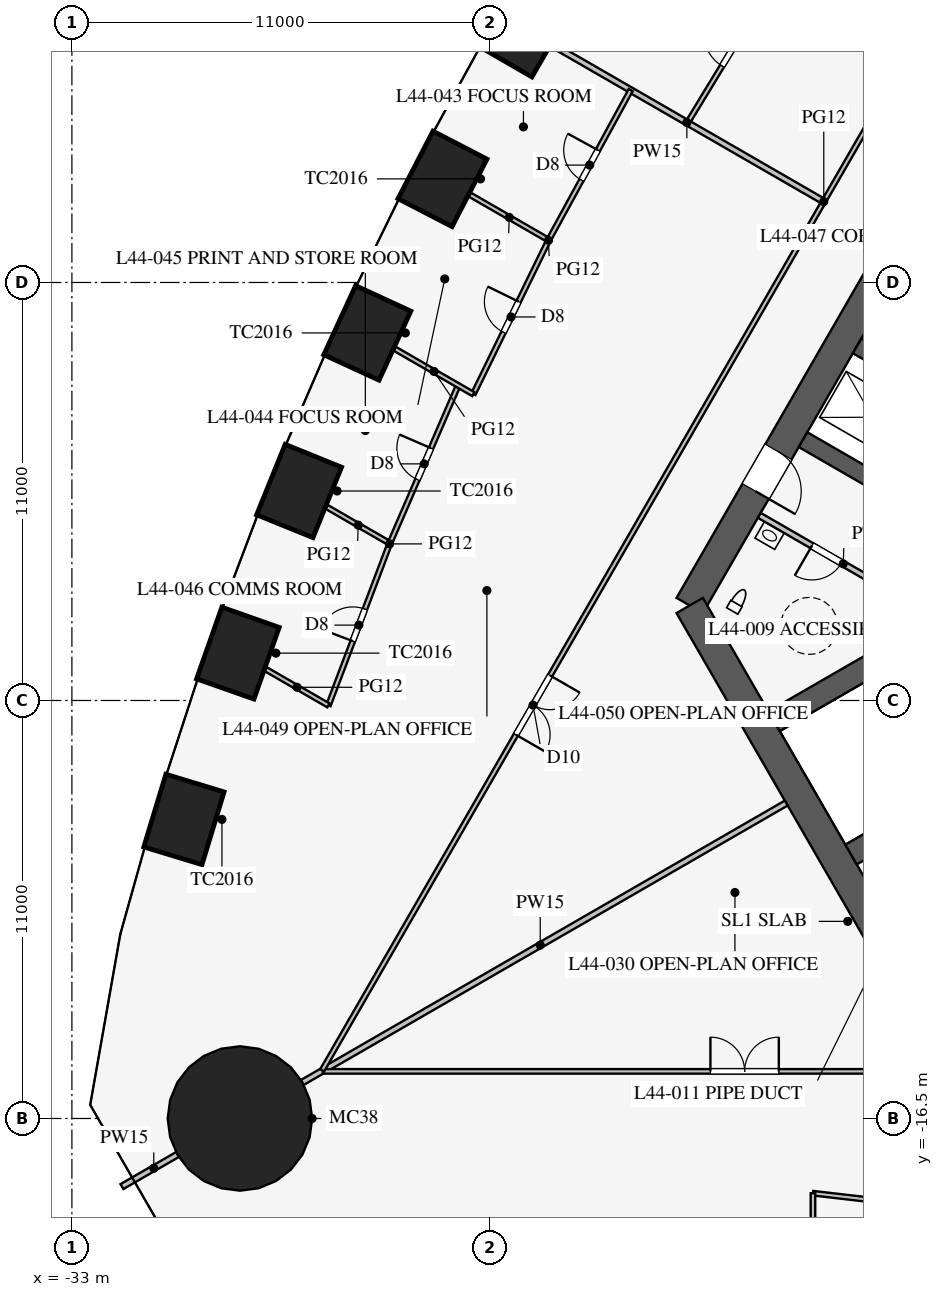
"""IFC4 building model, lengths in metres.
Left out: names, types, materials, properties, quantities, classifications, styles, units other than length and angle.
Written with IfcOpenShell. Run it as: python <this file> out.ifc"""

import sys

from ifc_helpers import new_model, si_unit, direction, frame, frame_2d, origin, origin_2d, place, context, subcontext, project, spatial, rectangle, circle, extrude, element, fill, save


model = new_model("IFC4")
c1 = context("Model", 3, precision=1e-05, world=origin(), true_north=direction((0.0, 1.0)))
c2 = subcontext(c1, "Body", "Model", "MODEL_VIEW")
j1 = project(units=[si_unit("LENGTHUNIT", "METRE"), si_unit("PLANEANGLEUNIT", "RADIAN")], contexts=[c1])
p1 = place(None, origin())
s1 = spatial("IfcSite", under=j1, at=p1, CompositionType="ELEMENT")
p2 = place(p1, origin())
s2 = spatial("IfcBuilding", under=s1, at=p2, CompositionType="ELEMENT")
p3 = place(p2, frame((0.0, 0.0, 193.9)))
s3 = spatial("IfcBuildingStorey", under=s2, at=p3, CompositionType="ELEMENT", Elevation=193.9)
for number, where, z_axis, x_axis in (
    (1, (-21.088, 12.175, 0.0), (0.0, 0.0, 1.0), (-0.5, -0.866, 0.0)),
    (2, (-23.248, 8.226, 0.0), (0.0, 0.0, 1.0), (-0.46, -0.888, 0.0)),
    (3, (-25.227, 4.172, 0.0), (0.0, 0.0, 1.0), (-0.418, -0.908, 0.0)),
    (4, (-27.022, 0.013, 0.0), (0.0, 0.0, 1.0), (-0.376, -0.927, 0.0)),
    (5, (-28.632, -4.254, 0.0), (0.0, 0.0, 1.0), (-0.332, -0.943, 0.0)),
    (6, (-30.052, -8.63, 0.0), (0.0, 0.0, 1.0), (-0.29, -0.957, 0.0)),
):
    element("IfcColumn", number, at=place(p3, frame(where, z_axis=z_axis, x_axis=x_axis)), inside=s3, PredefinedType="COLUMN", context=c2, shape_type="SweptSolid", body=[
        extrude(rectangle(XDim=2.0, YDim=1.6, at=origin_2d()), origin(), (0.0, 0.0, 1.0), 4.2),
    ])
p4 = place(p3, frame((-28.579, -16.5, 0.0), z_axis=(0.0, 0.0, 1.0), x_axis=(1.0, 0.0, 0.0)))
e7 = element("IfcColumn", 7, at=p4, inside=s3, PredefinedType="COLUMN", context=c2, shape_type="SweptSolid", body=[
    extrude(circle(Radius=1.9, at=origin_2d()), origin(), (0.0, 0.0, 1.0), 4.2),
])
p5 = place(p3, frame((-5.773, 16.0, 0.0), z_axis=(0.0, 0.0, 1.0), x_axis=(-0.500002442456, -0.866023993627, 0.0)))
e8 = element("IfcWall", 8, at=p5, inside=s3, PredefinedType="SHEAR", context=c2, shape_type="SweptSolid", body=[
    extrude(rectangle(XDim=21.939, YDim=0.8, at=frame_2d((10.97, 0.0))), origin(), (0.0, 0.0, 1.0), 4.2),
])
p6 = place(p5, frame((17.27, 0.0, 0.0)))
e9 = element("IfcOpeningElement", 9, at=p6, cuts=e8, PredefinedType="OPENING", context=c2, shape_type="SweptSolid", body=[
    extrude(rectangle(XDim=1.2, YDim=2.1, at=frame_2d((0.6, 1.05))), frame((0.0, 0.41, 0.0), z_axis=(0.0, -1.0, 0.0), x_axis=(1.0, 0.0, 0.0)), (0.0, 0.0, 1.0), 0.82),
])
p7 = place(p5, frame((3.47, 0.0, 0.0)))
e10 = element("IfcOpeningElement", 10, at=p7, cuts=e8, PredefinedType="OPENING", context=c2, shape_type="SweptSolid", body=[
    extrude(rectangle(XDim=1.2, YDim=2.1, at=frame_2d((0.6, 1.05))), frame((0.0, 0.41, 0.0), z_axis=(0.0, -1.0, 0.0), x_axis=(1.0, 0.0, 0.0)), (0.0, 0.0, 1.0), 0.82),
])
p8 = place(p3, frame((-16.743, -3.0, 0.0), z_axis=(0.0, 0.0, 1.0), x_axis=(0.499995765644, -0.866027848477, 0.0)))
e11 = element("IfcWall", 11, at=p8, inside=s3, PredefinedType="SHEAR", context=c2, shape_type="SweptSolid", body=[
    extrude(rectangle(XDim=11.547, YDim=0.8, at=frame_2d((5.773, 0.0))), origin(), (0.0, 0.0, 1.0), 4.2),
])
for number, where, z_axis, x_axis in (
    (12, (-10.107, 2.544, 0.0), (0.0, 0.0, 1.0), (-0.866, 0.5, 0.0)),
    (13, (-11.532, 0.076, 0.0), (0.0, 0.0, 1.0), (-0.866, 0.5, 0.0)),
):
    element("IfcWall", number, at=place(p3, frame(where, z_axis=z_axis, x_axis=x_axis)), inside=s3, PredefinedType="SHEAR", context=c2, shape_type="SweptSolid", body=[
        extrude(rectangle(XDim=2.575, YDim=0.45, at=frame_2d((1.288, 0.0))), origin(), (0.0, 0.0, 1.0), 4.2),
    ])
for number, where, z_axis, x_axis in (
    (14, (-6.663, -1.509, 0.0), (0.0, 0.0, 1.0), (-0.866, -0.5, 0.0)),
    (15, (-4.638, -5.016, 0.0), (0.0, 0.0, 1.0), (-0.866, -0.5, 0.0)),
):
    element("IfcWall", number, at=place(p3, frame(where, z_axis=z_axis, x_axis=x_axis)), inside=s3, PredefinedType="SHEAR", context=c2, shape_type="SweptSolid", body=[
        extrude(rectangle(XDim=9.075, YDim=0.6, at=frame_2d((4.538, 0.0))), origin(), (0.0, 0.0, 1.0), 4.2),
    ])
p9 = place(p3, frame((-10.495, -3.178, 0.0), z_axis=(0.0, 0.0, 1.0), x_axis=(-0.86602216432, 0.500005610874, 0.0)))
e16 = element("IfcWall", 16, at=p9, inside=s3, PredefinedType="PARTITIONING", context=c2, shape_type="SweptSolid", body=[
    extrude(rectangle(XDim=5.1, YDim=0.15, at=frame_2d((2.55, 0.0))), origin(), (0.0, 0.0, 1.0), 4.0),
])
p10 = place(p9, frame((2.6, 0.0, 0.0)))
e17 = element("IfcOpeningElement", 17, at=p10, cuts=e16, PredefinedType="OPENING", context=c2, shape_type="SweptSolid", body=[
    extrude(rectangle(XDim=0.9, YDim=2.1, at=frame_2d((0.45, 1.05))), frame((0.0, 0.085, 0.0), z_axis=(0.0, -1.0, 0.0), x_axis=(1.0, 0.0, 0.0)), (0.0, 0.0, 1.0), 0.17),
])
p11 = place(p3, frame((-14.203, -8.2, 0.0), z_axis=(0.0, 0.0, 1.0), x_axis=(-0.866021600284, -0.500006587798, 0.0)))
e18 = element("IfcWall", 18, at=p11, inside=s3, PredefinedType="PARTITIONING", context=c2, shape_type="SweptSolid", body=[
    extrude(rectangle(XDim=14.95, YDim=0.15, at=frame_2d((7.475, 0.0))), origin(), (0.0, 0.0, 1.0), 2.4),
])
p12 = place(p3, frame((-30.008, -17.325, 0.0), z_axis=(0.0, 0.0, 1.0), x_axis=(-0.866013246922, -0.500021055713, 0.0)))
e19 = element("IfcWall", 19, at=p12, inside=s3, PredefinedType="PARTITIONING", context=c2, shape_type="SweptSolid", body=[
    extrude(rectangle(XDim=1.935, YDim=0.15, at=frame_2d((0.967, 0.0))), origin(), (0.0, 0.0, 1.0), 2.4),
])
p13 = place(p3, frame((-26.398, -15.26, 0.0), z_axis=(0.0, 0.0, 1.0), x_axis=(1.0, 0.0, 0.0)))
e20 = element("IfcWall", 20, at=p13, inside=s3, PredefinedType="PARTITIONING", context=c2, shape_type="SweptSolid", body=[
    extrude(rectangle(XDim=52.796, YDim=0.12, at=frame_2d((26.398, 0.0))), origin(), (0.0, 0.0, 1.0), 2.9),
])
p14 = place(p13, frame((10.2, 0.0, 0.15)))
e21 = element("IfcOpeningElement", 21, at=p14, cuts=e20, PredefinedType="OPENING", context=c2, shape_type="SweptSolid", body=[
    extrude(rectangle(XDim=1.8, YDim=2.1, at=frame_2d((0.9, 1.05))), frame((0.0, 0.07, 0.0), z_axis=(0.0, -1.0, 0.0), x_axis=(1.0, 0.0, 0.0)), (0.0, 0.0, 1.0), 0.14),
])
p15 = place(p13, frame((40.8, 0.0, 0.15)))
e22 = element("IfcOpeningElement", 22, at=p15, cuts=e20, PredefinedType="OPENING", context=c2, shape_type="SweptSolid", body=[
    extrude(rectangle(XDim=1.8, YDim=2.1, at=frame_2d((0.9, 1.05))), frame((0.0, 0.07, 0.0), z_axis=(0.0, -1.0, 0.0), x_axis=(1.0, 0.0, 0.0)), (0.0, 0.0, 1.0), 0.14),
])
p16 = place(p3, frame((-13.5, -18.466, 0.0), z_axis=(0.0, 0.0, 1.0), x_axis=(0.993382946625, -0.114849124309, 0.0)))
e23 = element("IfcWall", 23, at=p16, inside=s3, PredefinedType="PARTITIONING", context=c2, shape_type="SweptSolid", body=[
    extrude(rectangle(XDim=4.53, YDim=0.12, at=frame_2d((2.265, 0.0))), origin(), (0.0, 0.0, 1.0), 2.9),
])
p17 = place(p3, frame((-13.5, -18.466, 0.0), z_axis=(0.0, 0.0, 1.0), x_axis=(0.0, -1.0, 0.0)))
e24 = element("IfcWall", 24, at=p17, inside=s3, PredefinedType="PARTITIONING", context=c2, shape_type="SweptSolid", body=[
    extrude(rectangle(XDim=4.104, YDim=0.12, at=frame_2d((2.052, 0.0))), origin(), (0.0, 0.0, 1.0), 2.8),
])
p18 = place(p3, frame((-13.268, 7.66, 0.0), z_axis=(0.0, 0.0, 1.0), x_axis=(-0.866019499219, 0.500010226868, 0.0)))
e25 = element("IfcWall", 25, at=p18, inside=s3, PredefinedType="PARTITIONING", context=c2, shape_type="SweptSolid", body=[
    extrude(rectangle(XDim=8.2, YDim=0.15, at=frame_2d((4.1, 0.0))), origin(), (0.0, 0.0, 1.0), 2.992),
])
p19 = place(p3, frame((-0.016, 30.491, 0.0), z_axis=(0.0, 0.0, 1.0), x_axis=(-0.50000091641, -0.866024874695, 0.0)))
e26 = element("IfcWall", 26, at=p19, inside=s3, PredefinedType="PARTITIONING", context=c2, shape_type="SweptSolid", body=[
    extrude(rectangle(XDim=52.796, YDim=0.12, at=frame_2d((26.398, 0.0))), origin(), (0.0, 0.0, 1.0), 2.9),
])
p20 = place(p19, frame((10.2, 0.0, 0.15)))
e27 = element("IfcOpeningElement", 27, at=p20, cuts=e26, PredefinedType="OPENING", context=c2, shape_type="SweptSolid", body=[
    extrude(rectangle(XDim=1.8, YDim=2.1, at=frame_2d((0.9, 1.05))), frame((0.0, 0.07, 0.0), z_axis=(0.0, -1.0, 0.0), x_axis=(1.0, 0.0, 0.0)), (0.0, 0.0, 1.0), 0.14),
])
p21 = place(p19, frame((40.8, 0.0, 0.15)))
e28 = element("IfcOpeningElement", 28, at=p21, cuts=e26, PredefinedType="OPENING", context=c2, shape_type="SweptSolid", body=[
    extrude(rectangle(XDim=1.8, YDim=2.1, at=frame_2d((0.9, 1.05))), frame((0.0, 0.07, 0.0), z_axis=(0.0, -1.0, 0.0), x_axis=(1.0, 0.0, 0.0)), (0.0, 0.0, 1.0), 0.14),
])
p22 = place(p3, frame((-18.295, 10.563, 0.0), z_axis=(0.0, 0.0, 1.0), x_axis=(-0.479972822547, -0.877283357654, 0.0)))
e29 = element("IfcWall", 29, at=p22, inside=s3, PredefinedType="PARTITIONING", context=c2, shape_type="SweptSolid", body=[
    extrude(rectangle(XDim=4.501, YDim=0.12, at=frame_2d((2.25, 0.0))), origin(), (0.0, 0.0, 1.0), 2.9),
])
p23 = place(p22, frame((1.8, 0.0, 0.15)))
e30 = element("IfcOpeningElement", 30, at=p23, cuts=e29, PredefinedType="OPENING", context=c2, shape_type="SweptSolid", body=[
    extrude(rectangle(XDim=0.9, YDim=2.1, at=frame_2d((0.45, 1.05))), frame((0.0, 0.07, 0.0), z_axis=(0.0, -1.0, 0.0), x_axis=(1.0, 0.0, 0.0)), (0.0, 0.0, 1.0), 0.14),
])
p24 = place(p3, frame((-24.634, -1.366, 0.0), z_axis=(0.0, 0.0, 1.0), x_axis=(-0.3542667952, -0.935144394101, 0.0)))
e31 = element("IfcWall", 31, at=p24, inside=s3, PredefinedType="PARTITIONING", context=c2, shape_type="SweptSolid", body=[
    extrude(rectangle(XDim=4.559, YDim=0.12, at=frame_2d((2.28, 0.0))), origin(), (0.0, 0.0, 1.0), 2.9),
])
p25 = place(p24, frame((1.85, 0.0, 0.15)))
e32 = element("IfcOpeningElement", 32, at=p25, cuts=e31, PredefinedType="OPENING", context=c2, shape_type="SweptSolid", body=[
    extrude(rectangle(XDim=0.9, YDim=2.1, at=frame_2d((0.45, 1.05))), frame((0.0, 0.07, 0.0), z_axis=(0.0, -1.0, 0.0), x_axis=(1.0, 0.0, 0.0)), (0.0, 0.0, 1.0), 0.14),
])
p26 = place(p3, frame((-20.456, 6.614, 0.0), z_axis=(0.0, 0.0, 1.0), x_axis=(-0.43911984878, -0.898428493764, 0.0)))
e33 = element("IfcWall", 33, at=p26, inside=s3, PredefinedType="PARTITIONING", context=c2, shape_type="SweptSolid", body=[
    extrude(rectangle(XDim=4.511, YDim=0.12, at=frame_2d((2.255, 0.0))), origin(), (0.0, 0.0, 1.0), 2.9),
])
p27 = place(p26, frame((1.8, 0.0, 0.15)))
e34 = element("IfcOpeningElement", 34, at=p27, cuts=e33, PredefinedType="OPENING", context=c2, shape_type="SweptSolid", body=[
    extrude(rectangle(XDim=0.9, YDim=2.1, at=frame_2d((0.45, 1.05))), frame((0.0, 0.07, 0.0), z_axis=(0.0, -1.0, 0.0), x_axis=(1.0, 0.0, 0.0)), (0.0, 0.0, 1.0), 0.14),
])
p28 = place(p3, frame((-22.835, 2.792, 0.0), z_axis=(0.0, 0.0, 1.0), x_axis=(-0.397208101111, -0.917728567939, 0.0)))
e35 = element("IfcWall", 35, at=p28, inside=s3, PredefinedType="PARTITIONING", context=c2, shape_type="SweptSolid", body=[
    extrude(rectangle(XDim=4.53, YDim=0.12, at=frame_2d((2.265, 0.0))), origin(), (0.0, 0.0, 1.0), 2.9),
])
p29 = place(p28, frame((1.8, 0.0, 0.15)))
e36 = element("IfcOpeningElement", 36, at=p29, cuts=e35, PredefinedType="OPENING", context=c2, shape_type="SweptSolid", body=[
    extrude(rectangle(XDim=0.9, YDim=2.1, at=frame_2d((0.45, 1.05))), frame((0.0, 0.07, 0.0), z_axis=(0.0, -1.0, 0.0), x_axis=(1.0, 0.0, 0.0)), (0.0, 0.0, 1.0), 0.14),
])
p30 = place(p3, frame((-14.462, 13.546, 0.0), z_axis=(0.0, 0.0, 1.0), x_axis=(-0.519790350351, -0.85429385558, 0.0)))
e37 = element("IfcWall", 37, at=p30, inside=s3, PredefinedType="PARTITIONING", context=c2, shape_type="SweptSolid", body=[
    extrude(rectangle(XDim=4.501, YDim=0.12, at=frame_2d((2.25, 0.0))), origin(), (0.0, 0.0, 1.0), 2.9),
])
p31 = place(p30, frame((1.75, 0.0, 0.15)))
e38 = element("IfcOpeningElement", 38, at=p31, cuts=e37, PredefinedType="OPENING", context=c2, shape_type="SweptSolid", body=[
    extrude(rectangle(XDim=1.0, YDim=2.1, at=frame_2d((0.5, 1.05))), frame((0.0, 0.07, 0.0), z_axis=(0.0, -1.0, 0.0), x_axis=(1.0, 0.0, 0.0)), (0.0, 0.0, 1.0), 0.14),
])
p32 = place(p3, frame((-24.634, -1.366, 0.0), z_axis=(0.0, 0.0, 1.0), x_axis=(-0.86603520599, 0.499983021698, 0.0)))
e39 = element("IfcWall", 39, at=p32, inside=s3, PredefinedType="PARTITIONING", context=c2, shape_type="SweptSolid", body=[
    extrude(rectangle(XDim=1.919, YDim=0.12, at=frame_2d((0.96, 0.0))), origin(), (0.0, 0.0, 1.0), 2.8),
])
p33 = place(p3, frame((-26.25, -5.629, 0.0), z_axis=(0.0, 0.0, 1.0), x_axis=(-0.866036337748, 0.499981061341, 0.0)))
e40 = element("IfcWall", 40, at=p33, inside=s3, PredefinedType="PARTITIONING", context=c2, shape_type="SweptSolid", body=[
    extrude(rectangle(XDim=1.907, YDim=0.12, at=frame_2d((0.953, 0.0))), origin(), (0.0, 0.0, 1.0), 2.8),
])
p34 = place(p3, frame((-20.456, 6.614, 0.0), z_axis=(0.0, 0.0, 1.0), x_axis=(-0.866030989016, 0.499990325971, 0.0)))
e41 = element("IfcWall", 41, at=p34, inside=s3, PredefinedType="PARTITIONING", context=c2, shape_type="SweptSolid", body=[
    extrude(rectangle(XDim=2.393, YDim=0.12, at=frame_2d((1.197, 0.0))), origin(), (0.0, 0.0, 1.0), 2.9),
])
p35 = place(p3, frame((-22.437, 2.562, 0.0), z_axis=(0.0, 0.0, 1.0), x_axis=(-0.866013634004, 0.500020385304, 0.0)))
e42 = element("IfcWall", 42, at=p35, inside=s3, PredefinedType="PARTITIONING", context=c2, shape_type="SweptSolid", body=[
    extrude(rectangle(XDim=2.388, YDim=0.12, at=frame_2d((1.194, 0.0))), origin(), (0.0, 0.0, 1.0), 2.9),
])
p36 = place(p10, origin())
e43 = element("IfcDoor", 43, at=p36, inside=s3, OperationType="SINGLE_SWING_RIGHT", PredefinedType="DOOR", context=c2, shape_type="SweptSolid", body=[
    extrude(rectangle(XDim=0.9, YDim=2.1, at=frame_2d((0.45, 1.05))), frame((0.0, 0.025, 0.0), z_axis=(0.0, -1.0, 0.0), x_axis=(1.0, 0.0, 0.0)), (0.0, 0.0, 1.0), 0.05),
])
fill(e17, e43)
p37 = place(p6, origin())
e44 = element("IfcDoor", 44, at=p37, inside=s3, OperationType="SINGLE_SWING_RIGHT", PredefinedType="DOOR", context=c2, shape_type="SweptSolid", body=[
    extrude(rectangle(XDim=1.2, YDim=2.1, at=frame_2d((0.6, 1.05))), frame((0.0, 0.025, 0.0), z_axis=(0.0, -1.0, 0.0), x_axis=(1.0, 0.0, 0.0)), (0.0, 0.0, 1.0), 0.05),
])
fill(e9, e44)
p38 = place(p14, origin())
e45 = element("IfcDoor", 45, at=p38, inside=s3, OperationType="DOUBLE_DOOR_SINGLE_SWING", PredefinedType="DOOR", context=c2, shape_type="SweptSolid", body=[
    extrude(rectangle(XDim=1.8, YDim=2.1, at=frame_2d((0.9, 1.05))), frame((0.0, 0.025, 0.0), z_axis=(0.0, -1.0, 0.0), x_axis=(1.0, 0.0, 0.0)), (0.0, 0.0, 1.0), 0.05),
])
fill(e21, e45)
p39 = place(p31, frame((1.0, 0.0, 0.0), z_axis=(0.0, 0.0, 1.0), x_axis=(-1.0, 0.0, 0.0)))
e46 = element("IfcDoor", 46, at=p39, inside=s3, OperationType="SINGLE_SWING_RIGHT", PredefinedType="DOOR", context=c2, shape_type="SweptSolid", body=[
    extrude(rectangle(XDim=1.0, YDim=2.1, at=frame_2d((0.5, 1.05))), frame((0.0, 0.025, 0.0), z_axis=(0.0, -1.0, 0.0), x_axis=(1.0, 0.0, 0.0)), (0.0, 0.0, 1.0), 0.05),
])
fill(e38, e46)
p40 = place(p23, frame((0.9, 0.0, 0.0), z_axis=(0.0, 0.0, 1.0), x_axis=(-1.0, 0.0, 0.0)))
e47 = element("IfcDoor", 47, at=p40, inside=s3, OperationType="SINGLE_SWING_RIGHT", PredefinedType="DOOR", context=c2, shape_type="SweptSolid", body=[
    extrude(rectangle(XDim=0.9, YDim=2.1, at=frame_2d((0.45, 1.05))), frame((0.0, 0.025, 0.0), z_axis=(0.0, -1.0, 0.0), x_axis=(1.0, 0.0, 0.0)), (0.0, 0.0, 1.0), 0.05),
])
fill(e30, e47)
p41 = place(p27, frame((0.9, 0.0, 0.0), z_axis=(0.0, 0.0, 1.0), x_axis=(-1.0, 0.0, 0.0)))
e48 = element("IfcDoor", 48, at=p41, inside=s3, OperationType="SINGLE_SWING_RIGHT", PredefinedType="DOOR", context=c2, shape_type="SweptSolid", body=[
    extrude(rectangle(XDim=0.9, YDim=2.1, at=frame_2d((0.45, 1.05))), frame((0.0, 0.025, 0.0), z_axis=(0.0, -1.0, 0.0), x_axis=(1.0, 0.0, 0.0)), (0.0, 0.0, 1.0), 0.05),
])
fill(e34, e48)
p42 = place(p29, frame((0.9, 0.0, 0.0), z_axis=(0.0, 0.0, 1.0), x_axis=(-1.0, 0.0, 0.0)))
e49 = element("IfcDoor", 49, at=p42, inside=s3, OperationType="SINGLE_SWING_RIGHT", PredefinedType="DOOR", context=c2, shape_type="SweptSolid", body=[
    extrude(rectangle(XDim=0.9, YDim=2.1, at=frame_2d((0.45, 1.05))), frame((0.0, 0.025, 0.0), z_axis=(0.0, -1.0, 0.0), x_axis=(1.0, 0.0, 0.0)), (0.0, 0.0, 1.0), 0.05),
])
fill(e36, e49)
p43 = place(p25, frame((0.9, 0.0, 0.0), z_axis=(0.0, 0.0, 1.0), x_axis=(-1.0, 0.0, 0.0)))
e50 = element("IfcDoor", 50, at=p43, inside=s3, OperationType="SINGLE_SWING_LEFT", PredefinedType="DOOR", context=c2, shape_type="SweptSolid", body=[
    extrude(rectangle(XDim=0.9, YDim=2.1, at=frame_2d((0.45, 1.05))), frame((0.0, 0.025, 0.0), z_axis=(0.0, -1.0, 0.0), x_axis=(1.0, 0.0, 0.0)), (0.0, 0.0, 1.0), 0.05),
])
fill(e32, e50)
p44 = place(p21, origin())
e51 = element("IfcDoor", 51, at=p44, inside=s3, OperationType="DOUBLE_DOOR_SINGLE_SWING", PredefinedType="DOOR", context=c2, shape_type="SweptSolid", body=[
    extrude(rectangle(XDim=1.8, YDim=2.1, at=frame_2d((0.9, 1.05))), frame((0.0, 0.025, 0.0), z_axis=(0.0, -1.0, 0.0), x_axis=(1.0, 0.0, 0.0)), (0.0, 0.0, 1.0), 0.05),
])
fill(e28, e51)
save(model, sys.argv[1])
